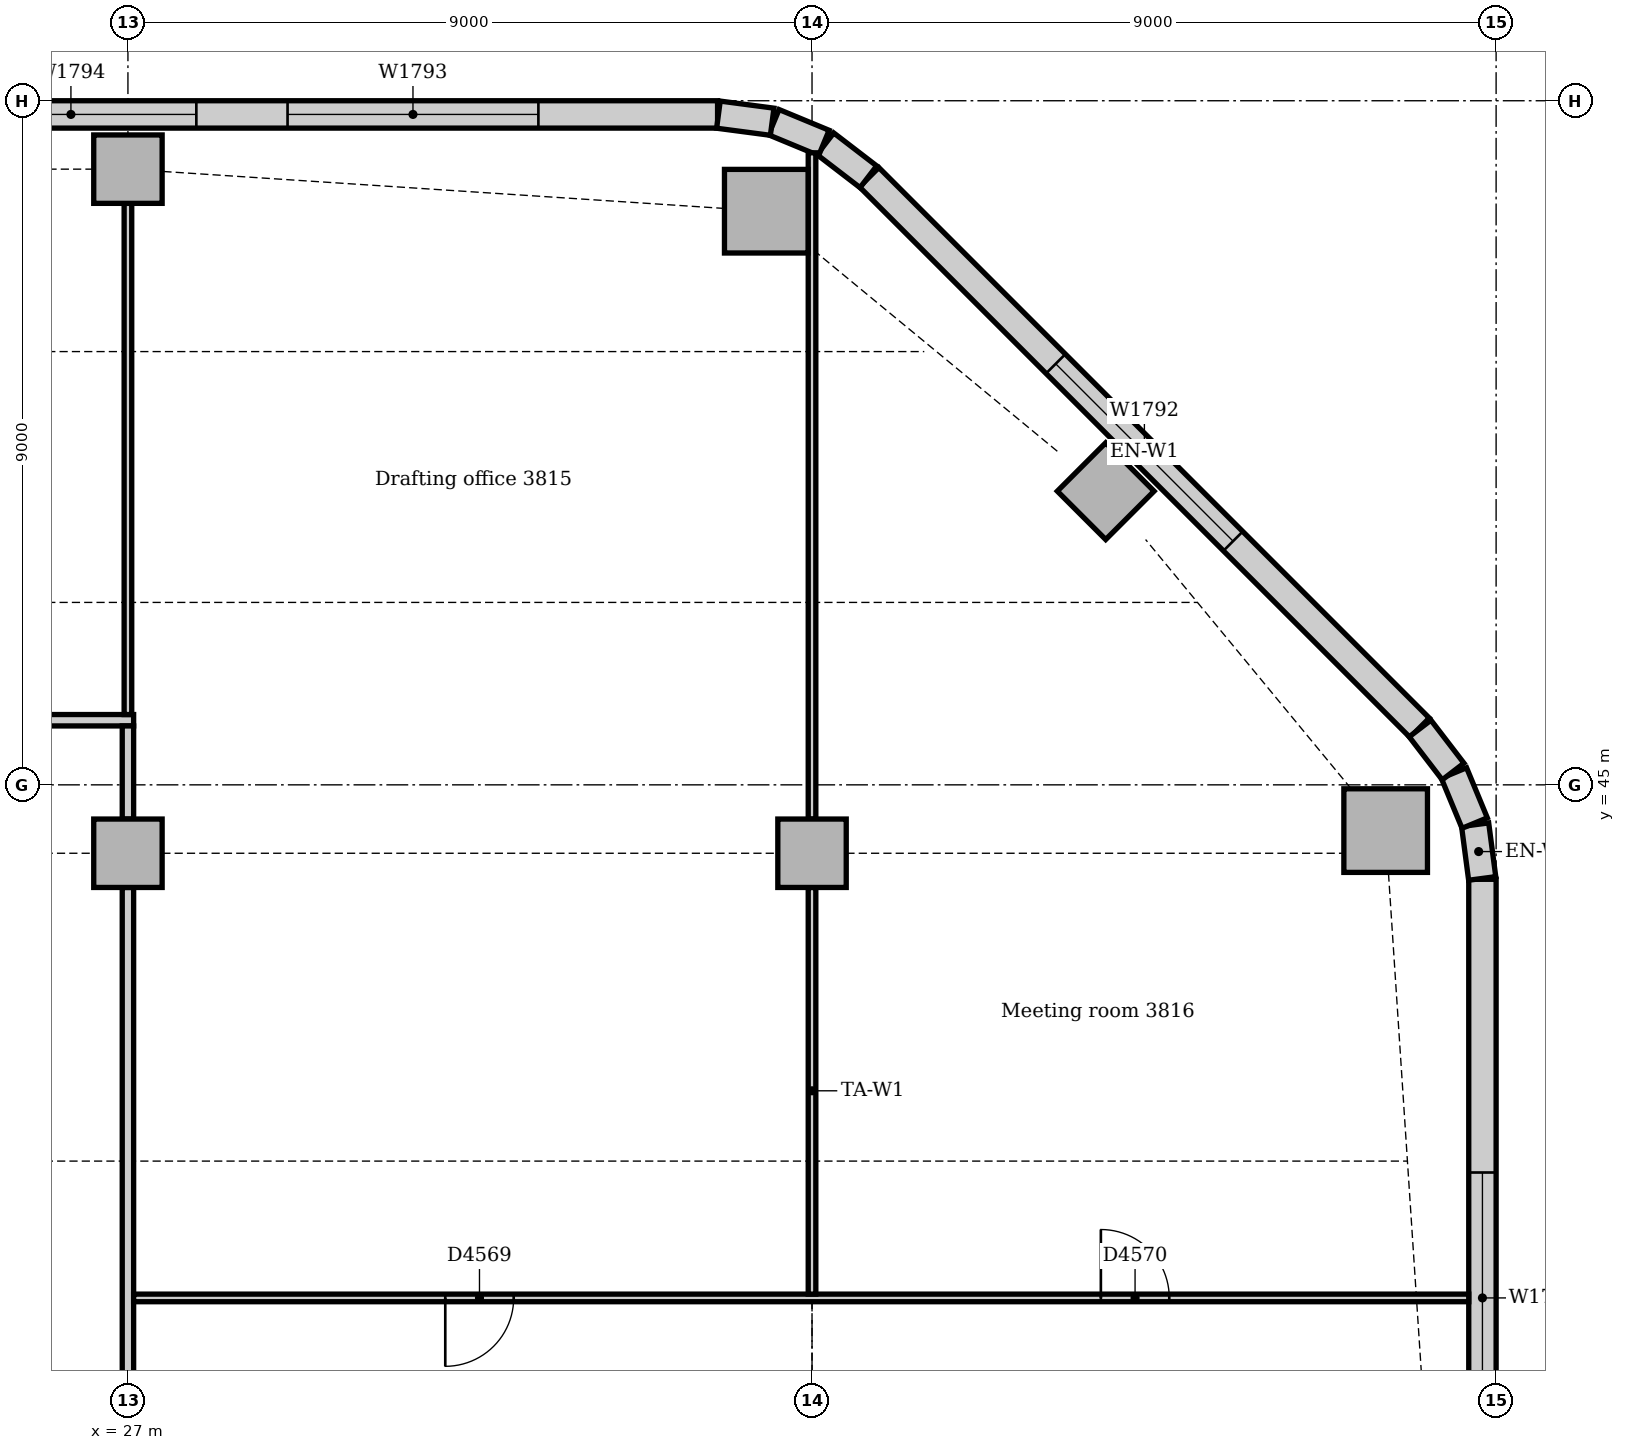
"""IFC4 building model, lengths in metres.
Left out: names, types, materials, properties, quantities, classifications, styles, units other than length and angle.
Written with IfcOpenShell. Run it as: python <this file> out.ifc"""

import sys

from ifc_helpers import new_model, si_unit, direction, frame, frame_2d, origin, origin_2d, place, context, subcontext, project, spatial, rectangle, extrude, element, fill, save


model = new_model("IFC4")
c1 = context("Model", 3, precision=1e-05, world=origin(), true_north=direction((0.0, 1.0)))
c2 = subcontext(c1, "Body", "Model", "MODEL_VIEW")
j1 = project(units=[si_unit("LENGTHUNIT", "METRE"), si_unit("PLANEANGLEUNIT", "RADIAN")], contexts=[c1])
p1 = place(None, origin())
s1 = spatial("IfcSite", under=j1, at=p1, CompositionType="ELEMENT")
p2 = place(p1, origin())
s2 = spatial("IfcBuilding", under=s1, at=p2, CompositionType="ELEMENT")
p3 = place(p2, frame((0.0, 0.0, 161.0)))
s3 = spatial("IfcBuildingStorey", under=s2, at=p3, CompositionType="ELEMENT", Elevation=161.0)
for number, where, z_axis, x_axis in (
    (1, (43.547, 44.398, 0.0), (0.0, 0.0, 1.0), (1.0, 0.0, 0.0)),
    (2, (35.398, 52.547, 0.0), (0.0, 0.0, 1.0), (1.0, 0.0, 0.0)),
):
    element("IfcColumn", number, at=place(p3, frame(where, z_axis=z_axis, x_axis=x_axis)), inside=s3, PredefinedType="COLUMN", context=c2, shape_type="SweptSolid", body=[
        extrude(rectangle(XDim=1.1, YDim=1.1, at=origin_2d()), origin(), (0.0, 0.0, 1.0), 3.85),
    ])
for number, where, z_axis, x_axis in (
    (3, (39.864, 48.864, 0.0), (0.0, 0.0, 1.0), (0.707, 0.707, 0.0)),
    (4, (27.0, 53.1, 0.0), (0.0, 0.0, 1.0), (1.0, 0.0, 0.0)),
    (5, (27.0, 44.1, 0.0), (0.0, 0.0, 1.0), (1.0, 0.0, 0.0)),
    (6, (36.0, 44.1, 0.0), (0.0, 0.0, 1.0), (1.0, 0.0, 0.0)),
):
    element("IfcColumn", number, at=place(p3, frame(where, z_axis=z_axis, x_axis=x_axis)), inside=s3, PredefinedType="COLUMN", context=c2, shape_type="SweptSolid", body=[
        extrude(rectangle(XDim=0.9, YDim=0.9, at=origin_2d()), origin(), (0.0, 0.0, 1.0), 3.85),
    ])
p4 = place(p3, frame((44.82, 19.243, 0.0), z_axis=(0.0, 0.0, 1.0), x_axis=(0.0, 1.0, 0.0)))
e7 = element("IfcWall", 7, at=p4, inside=s3, PredefinedType="STANDARD", context=c2, shape_type="SweptSolid", body=[
    extrude(rectangle(XDim=24.515, YDim=0.36, at=frame_2d((12.257, 0.0))), origin(), (0.0, 0.0, 1.0), 3.85),
])
p5 = place(p4, frame((3.507, 0.0, 0.9)))
e8 = element("IfcOpeningElement", 8, at=p5, cuts=e7, PredefinedType="OPENING", context=c2, shape_type="SweptSolid", body=[
    extrude(rectangle(XDim=3.3, YDim=1.6, at=frame_2d((1.65, 0.8))), frame((0.0, 0.19, 0.0), z_axis=(0.0, -1.0, 0.0), x_axis=(1.0, 0.0, 0.0)), (0.0, 0.0, 1.0), 0.38),
])
p6 = place(p4, frame((8.357, 0.0, 0.9)))
e9 = element("IfcOpeningElement", 9, at=p6, cuts=e7, PredefinedType="OPENING", context=c2, shape_type="SweptSolid", body=[
    extrude(rectangle(XDim=3.3, YDim=1.6, at=frame_2d((1.65, 0.8))), frame((0.0, 0.19, 0.0), z_axis=(0.0, -1.0, 0.0), x_axis=(1.0, 0.0, 0.0)), (0.0, 0.0, 1.0), 0.38),
])
p7 = place(p4, frame((12.857, 0.0, 0.9)))
e10 = element("IfcOpeningElement", 10, at=p7, cuts=e7, PredefinedType="OPENING", context=c2, shape_type="SweptSolid", body=[
    extrude(rectangle(XDim=3.3, YDim=1.6, at=frame_2d((1.65, 0.8))), frame((0.0, 0.19, 0.0), z_axis=(0.0, -1.0, 0.0), x_axis=(1.0, 0.0, 0.0)), (0.0, 0.0, 1.0), 0.38),
])
p8 = place(p4, frame((17.357, 0.0, 0.9)))
e11 = element("IfcOpeningElement", 11, at=p8, cuts=e7, PredefinedType="OPENING", context=c2, shape_type="SweptSolid", body=[
    extrude(rectangle(XDim=3.3, YDim=1.6, at=frame_2d((1.65, 0.8))), frame((0.0, 0.19, 0.0), z_axis=(0.0, -1.0, 0.0), x_axis=(1.0, 0.0, 0.0)), (0.0, 0.0, 1.0), 0.38),
])
p9 = place(p3, frame((43.994, 45.751, 0.0), z_axis=(0.0, 0.0, 1.0), x_axis=(-0.707106781187, 0.707106781187, 0.0)))
e12 = element("IfcWall", 12, at=p9, inside=s3, PredefinedType="STANDARD", context=c2, shape_type="SweptSolid", body=[
    extrude(rectangle(XDim=10.243, YDim=0.36, at=frame_2d((5.121, 0.0))), origin(), (0.0, 0.0, 1.0), 3.85),
])
p10 = place(p9, frame((3.471, 0.0, 0.9)))
e13 = element("IfcOpeningElement", 13, at=p10, cuts=e12, PredefinedType="OPENING", context=c2, shape_type="SweptSolid", body=[
    extrude(rectangle(XDim=3.3, YDim=1.6, at=frame_2d((1.65, 0.8))), frame((0.0, 0.19, 0.0), z_axis=(0.0, -1.0, 0.0), x_axis=(1.0, 0.0, 0.0)), (0.0, 0.0, 1.0), 0.38),
])
p11 = place(p3, frame((34.757, 53.82, 0.0), z_axis=(0.0, 0.0, 1.0), x_axis=(-1.0, 0.0, 0.0)))
e14 = element("IfcWall", 14, at=p11, inside=s3, PredefinedType="STANDARD", context=c2, shape_type="SweptSolid", body=[
    extrude(rectangle(XDim=30.515, YDim=0.36, at=frame_2d((15.257, 0.0))), origin(), (0.0, 0.0, 1.0), 3.85),
])
p12 = place(p11, frame((2.357, 0.0, 0.9)))
e15 = element("IfcOpeningElement", 15, at=p12, cuts=e14, PredefinedType="OPENING", context=c2, shape_type="SweptSolid", body=[
    extrude(rectangle(XDim=3.3, YDim=1.6, at=frame_2d((1.65, 0.8))), frame((0.0, 0.19, 0.0), z_axis=(0.0, -1.0, 0.0), x_axis=(1.0, 0.0, 0.0)), (0.0, 0.0, 1.0), 0.38),
])
p13 = place(p11, frame((6.857, 0.0, 0.9)))
e16 = element("IfcOpeningElement", 16, at=p13, cuts=e14, PredefinedType="OPENING", context=c2, shape_type="SweptSolid", body=[
    extrude(rectangle(XDim=3.3, YDim=1.6, at=frame_2d((1.65, 0.8))), frame((0.0, 0.19, 0.0), z_axis=(0.0, -1.0, 0.0), x_axis=(1.0, 0.0, 0.0)), (0.0, 0.0, 1.0), 0.38),
])
p14 = place(p11, frame((11.357, 0.0, 0.9)))
e17 = element("IfcOpeningElement", 17, at=p14, cuts=e14, PredefinedType="OPENING", context=c2, shape_type="SweptSolid", body=[
    extrude(rectangle(XDim=3.3, YDim=1.6, at=frame_2d((1.65, 0.8))), frame((0.0, 0.19, 0.0), z_axis=(0.0, -1.0, 0.0), x_axis=(1.0, 0.0, 0.0)), (0.0, 0.0, 1.0), 0.38),
])
p15 = place(p11, frame((15.857, 0.0, 0.9)))
e18 = element("IfcOpeningElement", 18, at=p15, cuts=e14, PredefinedType="OPENING", context=c2, shape_type="SweptSolid", body=[
    extrude(rectangle(XDim=3.3, YDim=1.6, at=frame_2d((1.65, 0.8))), frame((0.0, 0.19, 0.0), z_axis=(0.0, -1.0, 0.0), x_axis=(1.0, 0.0, 0.0)), (0.0, 0.0, 1.0), 0.38),
])
p16 = place(p11, frame((20.357, 0.0, 0.9)))
e19 = element("IfcOpeningElement", 19, at=p16, cuts=e14, PredefinedType="OPENING", context=c2, shape_type="SweptSolid", body=[
    extrude(rectangle(XDim=3.3, YDim=1.6, at=frame_2d((1.65, 0.8))), frame((0.0, 0.19, 0.0), z_axis=(0.0, -1.0, 0.0), x_axis=(1.0, 0.0, 0.0)), (0.0, 0.0, 1.0), 0.38),
])
p17 = place(p11, frame((24.857, 0.0, 0.9)))
e20 = element("IfcOpeningElement", 20, at=p17, cuts=e14, PredefinedType="OPENING", context=c2, shape_type="SweptSolid", body=[
    extrude(rectangle(XDim=3.3, YDim=1.6, at=frame_2d((1.65, 0.8))), frame((0.0, 0.19, 0.0), z_axis=(0.0, -1.0, 0.0), x_axis=(1.0, 0.0, 0.0)), (0.0, 0.0, 1.0), 0.38),
])
for number, where, z_axis, x_axis in (
    (21, (44.817, 43.769, 0.0), (0.0, 0.0, 1.0), (-0.131, 0.991, 0.0)),
    (22, (44.718, 44.497, 0.0), (0.0, 0.0, 1.0), (-0.383, 0.924, 0.0)),
):
    element("IfcWall", number, at=place(p3, frame(where, z_axis=z_axis, x_axis=x_axis)), inside=s3, PredefinedType="STANDARD", context=c2, shape_type="SweptSolid", body=[
        extrude(rectangle(XDim=0.713, YDim=0.36, at=frame_2d((0.356, 0.0))), origin(), (0.0, 0.0, 1.0), 3.85),
    ])
for number, where, z_axis, x_axis in (
    (23, (44.434, 45.175, 0.0), (0.0, 0.0, 1.0), (-0.609, 0.793, 0.0)),
    (24, (36.741, 53.0, 0.0), (0.0, 0.0, 1.0), (-0.793, 0.609, 0.0)),
):
    element("IfcWall", number, at=place(p3, frame(where, z_axis=z_axis, x_axis=x_axis)), inside=s3, PredefinedType="STANDARD", context=c2, shape_type="SweptSolid", body=[
        extrude(rectangle(XDim=0.713, YDim=0.36, at=frame_2d((0.357, 0.0))), origin(), (0.0, 0.0, 1.0), 3.85),
    ])
for number, where, z_axis, x_axis in (
    (25, (36.156, 53.445, 0.0), (0.0, 0.0, 1.0), (-0.924, 0.383, 0.0)),
    (26, (35.476, 53.724, 0.0), (0.0, 0.0, 1.0), (-0.991, 0.131, 0.0)),
):
    element("IfcWall", number, at=place(p3, frame(where, z_axis=z_axis, x_axis=x_axis)), inside=s3, PredefinedType="STANDARD", context=c2, shape_type="SweptSolid", body=[
        extrude(rectangle(XDim=0.713, YDim=0.36, at=frame_2d((0.356, 0.0))), origin(), (0.0, 0.0, 1.0), 3.85),
    ])
p18 = place(p3, frame((1.903, 45.85, 0.0), z_axis=(0.0, 0.0, 1.0), x_axis=(1.0, 0.0, 0.0)))
e27 = element("IfcWall", 27, at=p18, inside=s3, PredefinedType="PARTITIONING", context=c2, shape_type="SweptSolid", body=[
    extrude(rectangle(XDim=25.172, YDim=0.15, at=frame_2d((12.586, 0.0))), origin(), (0.0, 0.0, 1.0), 3.85),
])
p19 = place(p18, frame((3.1, 0.0, 0.0)))
e28 = element("IfcOpeningElement", 28, at=p19, cuts=e27, PredefinedType="OPENING", context=c2, shape_type="SweptSolid", body=[
    extrude(rectangle(XDim=1.0, YDim=2.1, at=frame_2d((0.5, 1.05))), frame((0.0, 0.085, 0.0), z_axis=(0.0, -1.0, 0.0), x_axis=(1.0, 0.0, 0.0)), (0.0, 0.0, 1.0), 0.17),
])
p20 = place(p18, frame((11.147, 0.0, 0.0)))
e29 = element("IfcOpeningElement", 29, at=p20, cuts=e27, PredefinedType="OPENING", context=c2, shape_type="SweptSolid", body=[
    extrude(rectangle(XDim=0.9, YDim=2.1, at=frame_2d((0.45, 1.05))), frame((0.0, 0.085, 0.0), z_axis=(0.0, -1.0, 0.0), x_axis=(1.0, 0.0, 0.0)), (0.0, 0.0, 1.0), 0.17),
])
p21 = place(p18, frame((17.897, 0.0, 0.0)))
e30 = element("IfcOpeningElement", 30, at=p21, cuts=e27, PredefinedType="OPENING", context=c2, shape_type="SweptSolid", body=[
    extrude(rectangle(XDim=0.9, YDim=2.1, at=frame_2d((0.45, 1.05))), frame((0.0, 0.085, 0.0), z_axis=(0.0, -1.0, 0.0), x_axis=(1.0, 0.0, 0.0)), (0.0, 0.0, 1.0), 0.17),
])
p22 = place(p3, frame((27.0, 36.45, 0.0), z_axis=(0.0, 0.0, 1.0), x_axis=(0.0, 1.0, 0.0)))
e31 = element("IfcWall", 31, at=p22, inside=s3, PredefinedType="PARTITIONING", context=c2, shape_type="SweptSolid", body=[
    extrude(rectangle(XDim=7.2, YDim=0.15, at=frame_2d((3.6, 0.0))), origin(), (0.0, 0.0, 1.0), 3.362),
])
p23 = place(p3, frame((27.0, 44.55, 0.0), z_axis=(0.0, 0.0, 1.0), x_axis=(0.0, 1.0, 0.0)))
e32 = element("IfcWall", 32, at=p23, inside=s3, PredefinedType="PARTITIONING", context=c2, shape_type="SweptSolid", body=[
    extrude(rectangle(XDim=1.225, YDim=0.15, at=frame_2d((0.613, 0.0))), origin(), (0.0, 0.0, 1.0), 3.362),
])
p24 = place(p3, frame((27.075, 38.25, 0.0), z_axis=(0.0, 0.0, 1.0), x_axis=(1.0, 0.0, 0.0)))
e33 = element("IfcWall", 33, at=p24, inside=s3, PredefinedType="PARTITIONING", context=c2, shape_type="SweptSolid", body=[
    extrude(rectangle(XDim=17.565, YDim=0.1, at=frame_2d((8.783, 0.0))), origin(), (0.0, 0.0, 1.0), 3.85),
])
p25 = place(p24, frame((4.1, 0.0, 0.0)))
e34 = element("IfcOpeningElement", 34, at=p25, cuts=e33, PredefinedType="OPENING", context=c2, shape_type="SweptSolid", body=[
    extrude(rectangle(XDim=0.9, YDim=2.1, at=frame_2d((0.45, 1.05))), frame((0.0, 0.06, 0.0), z_axis=(0.0, -1.0, 0.0), x_axis=(1.0, 0.0, 0.0)), (0.0, 0.0, 1.0), 0.12),
])
p26 = place(p24, frame((12.725, 0.0, 0.0)))
e35 = element("IfcOpeningElement", 35, at=p26, cuts=e33, PredefinedType="OPENING", context=c2, shape_type="SweptSolid", body=[
    extrude(rectangle(XDim=0.9, YDim=2.1, at=frame_2d((0.45, 1.05))), frame((0.0, 0.06, 0.0), z_axis=(0.0, -1.0, 0.0), x_axis=(1.0, 0.0, 0.0)), (0.0, 0.0, 1.0), 0.12),
])
p27 = place(p3, frame((36.0, 38.3, 0.0), z_axis=(0.0, 0.0, 1.0), x_axis=(0.0, 1.0, 0.0)))
e36 = element("IfcWall", 36, at=p27, inside=s3, PredefinedType="PARTITIONING", context=c2, shape_type="SweptSolid", body=[
    extrude(rectangle(XDim=5.35, YDim=0.1, at=frame_2d((2.675, 0.0))), origin(), (0.0, 0.0, 1.0), 3.362),
])
p28 = place(p3, frame((36.0, 44.55, 0.0), z_axis=(0.0, 0.0, 1.0), x_axis=(0.0, 1.0, 0.0)))
e37 = element("IfcWall", 37, at=p28, inside=s3, PredefinedType="PARTITIONING", context=c2, shape_type="SweptSolid", body=[
    extrude(rectangle(XDim=8.765, YDim=0.1, at=frame_2d((4.383, 0.0))), origin(), (0.0, 0.0, 1.0), 3.362),
])
p29 = place(p3, frame((27.0, 45.925, 0.0), z_axis=(0.0, 0.0, 1.0), x_axis=(0.0, 1.0, 0.0)))
e38 = element("IfcWall", 38, at=p29, inside=s3, PredefinedType="PARTITIONING", context=c2, shape_type="SweptSolid", body=[
    extrude(rectangle(XDim=6.725, YDim=0.1, at=frame_2d((3.362, 0.0))), origin(), (0.0, 0.0, 1.0), 3.362),
])
p30 = place(p8, origin())
e39 = element("IfcWindow", 39, at=p30, inside=s3, PartitioningType="SINGLE_PANEL", PredefinedType="WINDOW", context=c2, shape_type="SweptSolid", body=[
    extrude(rectangle(XDim=3.3, YDim=1.6, at=frame_2d((1.65, 0.8))), frame((0.0, 0.13, 0.0), z_axis=(0.0, -1.0, 0.0), x_axis=(1.0, 0.0, 0.0)), (0.0, 0.0, 1.0), 0.06),
])
fill(e11, e39)
p31 = place(p10, origin())
e40 = element("IfcWindow", 40, at=p31, inside=s3, PartitioningType="SINGLE_PANEL", PredefinedType="WINDOW", context=c2, shape_type="SweptSolid", body=[
    extrude(rectangle(XDim=3.3, YDim=1.6, at=frame_2d((1.65, 0.8))), frame((0.0, 0.13, 0.0), z_axis=(0.0, -1.0, 0.0), x_axis=(1.0, 0.0, 0.0)), (0.0, 0.0, 1.0), 0.06),
])
fill(e13, e40)
p32 = place(p12, origin())
e41 = element("IfcWindow", 41, at=p32, inside=s3, PartitioningType="SINGLE_PANEL", PredefinedType="WINDOW", context=c2, shape_type="SweptSolid", body=[
    extrude(rectangle(XDim=3.3, YDim=1.6, at=frame_2d((1.65, 0.8))), frame((0.0, 0.13, 0.0), z_axis=(0.0, -1.0, 0.0), x_axis=(1.0, 0.0, 0.0)), (0.0, 0.0, 1.0), 0.06),
])
fill(e15, e41)
p33 = place(p13, origin())
e42 = element("IfcWindow", 42, at=p33, inside=s3, PartitioningType="SINGLE_PANEL", PredefinedType="WINDOW", context=c2, shape_type="SweptSolid", body=[
    extrude(rectangle(XDim=3.3, YDim=1.6, at=frame_2d((1.65, 0.8))), frame((0.0, 0.13, 0.0), z_axis=(0.0, -1.0, 0.0), x_axis=(1.0, 0.0, 0.0)), (0.0, 0.0, 1.0), 0.06),
])
fill(e16, e42)
p34 = place(p25, frame((0.9, 0.0, 0.0), z_axis=(0.0, 0.0, 1.0), x_axis=(-1.0, 0.0, 0.0)))
e43 = element("IfcDoor", 43, at=p34, inside=s3, OperationType="SINGLE_SWING_RIGHT", PredefinedType="DOOR", context=c2, shape_type="SweptSolid", body=[
    extrude(rectangle(XDim=0.9, YDim=2.1, at=frame_2d((0.45, 1.05))), frame((0.0, 0.025, 0.0), z_axis=(0.0, -1.0, 0.0), x_axis=(1.0, 0.0, 0.0)), (0.0, 0.0, 1.0), 0.05),
])
fill(e34, e43)
p35 = place(p26, origin())
e44 = element("IfcDoor", 44, at=p35, inside=s3, OperationType="SINGLE_SWING_LEFT", PredefinedType="DOOR", context=c2, shape_type="SweptSolid", body=[
    extrude(rectangle(XDim=0.9, YDim=2.1, at=frame_2d((0.45, 1.05))), frame((0.0, 0.025, 0.0), z_axis=(0.0, -1.0, 0.0), x_axis=(1.0, 0.0, 0.0)), (0.0, 0.0, 1.0), 0.05),
])
fill(e35, e44)
save(model, sys.argv[1])
